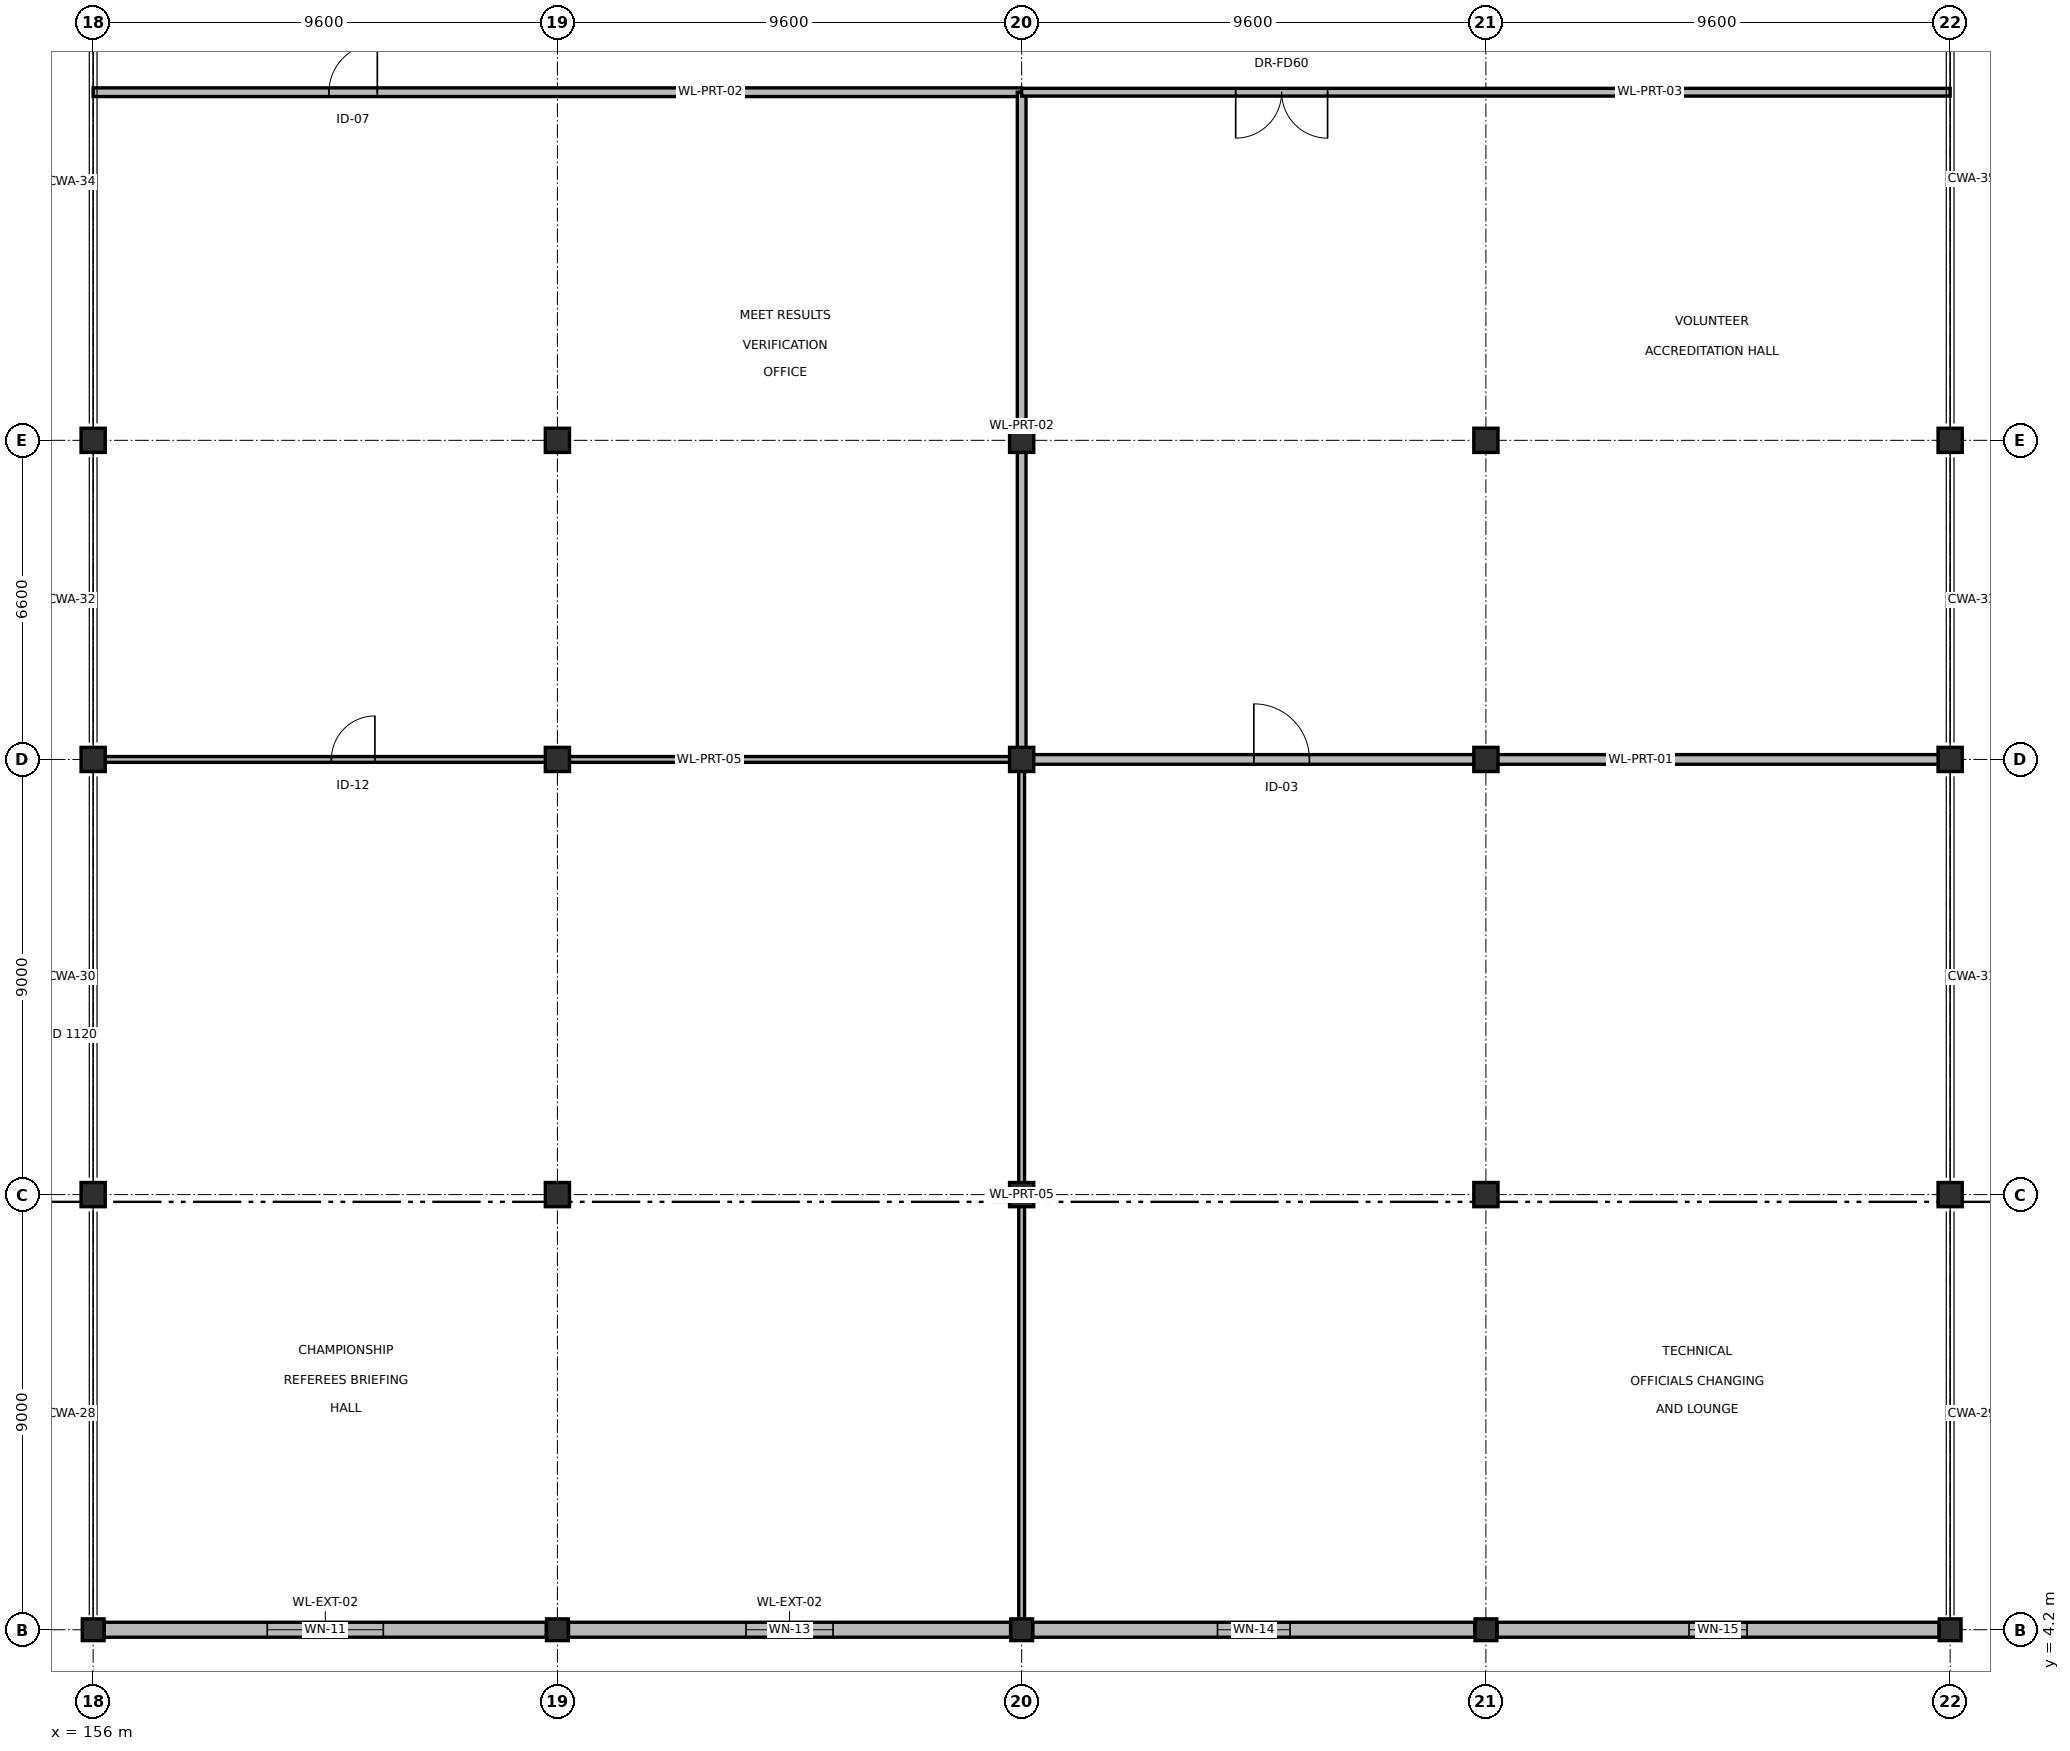
"""IFC4 building model, lengths in metres.
Left out: names, types, materials, properties, quantities, classifications, styles, units other than length and angle.
Written with IfcOpenShell. Run it as: python <this file> out.ifc"""

import sys

from ifc_helpers import new_model, si_unit, direction, frame, frame_2d, origin, origin_2d, place, context, subcontext, project, spatial, rectangle, extrude, element, fill, save


model = new_model("IFC4")
c1 = context("Model", 3, precision=1e-05, world=origin(), true_north=direction((0.0, 1.0)))
c2 = subcontext(c1, "Body", "Model", "MODEL_VIEW")
j1 = project(units=[si_unit("LENGTHUNIT", "METRE"), si_unit("PLANEANGLEUNIT", "RADIAN")], contexts=[c1])
p1 = place(None, origin())
s1 = spatial("IfcSite", under=j1, at=p1, CompositionType="ELEMENT")
p2 = place(p1, origin())
s2 = spatial("IfcBuilding", under=s1, at=p2, CompositionType="ELEMENT")
p3 = place(p2, frame((0.0, 0.0, 4.8)))
s3 = spatial("IfcBuildingStorey", under=s2, at=p3, CompositionType="ELEMENT", Elevation=4.8)
for number, where, z_axis, x_axis in (
    (1, (156.0, 13.2, 0.0), (0.0, 0.0, 1.0), (1.0, 0.0, 0.0)),
    (2, (156.0, 22.2, 0.0), (0.0, 0.0, 1.0), (1.0, 0.0, 0.0)),
    (3, (156.0, 28.8, 0.0), (0.0, 0.0, 1.0), (1.0, 0.0, 0.0)),
    (4, (165.6, 13.2, 0.0), (0.0, 0.0, 1.0), (1.0, 0.0, 0.0)),
    (5, (165.6, 22.2, 0.0), (0.0, 0.0, 1.0), (1.0, 0.0, 0.0)),
    (6, (165.6, 28.8, 0.0), (0.0, 0.0, 1.0), (1.0, 0.0, 0.0)),
    (7, (175.2, 13.2, 0.0), (0.0, 0.0, 1.0), (1.0, 0.0, 0.0)),
    (8, (175.2, 22.2, 0.0), (0.0, 0.0, 1.0), (1.0, 0.0, 0.0)),
    (9, (175.2, 28.8, 0.0), (0.0, 0.0, 1.0), (1.0, 0.0, 0.0)),
    (10, (184.8, 13.2, 0.0), (0.0, 0.0, 1.0), (1.0, 0.0, 0.0)),
    (11, (184.8, 22.2, 0.0), (0.0, 0.0, 1.0), (1.0, 0.0, 0.0)),
    (12, (184.8, 28.8, 0.0), (0.0, 0.0, 1.0), (1.0, 0.0, 0.0)),
    (13, (194.4, 13.2, 0.0), (0.0, 0.0, 1.0), (1.0, 0.0, 0.0)),
    (14, (194.4, 22.2, 0.0), (0.0, 0.0, 1.0), (1.0, 0.0, 0.0)),
    (15, (194.4, 28.8, 0.0), (0.0, 0.0, 1.0), (1.0, 0.0, 0.0)),
):
    element("IfcColumn", number, at=place(p3, frame(where, z_axis=z_axis, x_axis=x_axis)), inside=s3, PredefinedType="COLUMN", context=c2, shape_type="SweptSolid", body=[
        extrude(rectangle(XDim=0.5, YDim=0.5, at=origin_2d()), origin(), (0.0, 0.0, 1.0), 4.8),
    ])
for number, where, z_axis, x_axis in (
    (16, (156.0, 4.2, 0.0), (0.0, 0.0, 1.0), (1.0, 0.0, 0.0)),
    (17, (165.6, 4.2, 0.0), (0.0, 0.0, 1.0), (1.0, 0.0, 0.0)),
    (18, (175.2, 4.2, 0.0), (0.0, 0.0, 1.0), (1.0, 0.0, 0.0)),
    (19, (184.8, 4.2, 0.0), (0.0, 0.0, 1.0), (1.0, 0.0, 0.0)),
    (20, (194.4, 4.2, 0.0), (0.0, 0.0, 1.0), (1.0, 0.0, 0.0)),
):
    element("IfcColumn", number, at=place(p3, frame(where, z_axis=z_axis, x_axis=x_axis)), inside=s3, PredefinedType="COLUMN", context=c2, shape_type="SweptSolid", body=[
        extrude(rectangle(XDim=0.45, YDim=0.45, at=origin_2d()), origin(), (0.0, 0.0, 1.0), 4.8),
    ])
p4 = place(p3, frame((165.37, 4.2, 0.0), z_axis=(0.0, 0.0, 1.0), x_axis=(-1.0, 0.0, 0.0)))
e21 = element("IfcWall", 21, at=p4, inside=s3, PredefinedType="SOLIDWALL", context=c2, shape_type="SweptSolid", body=[
    extrude(rectangle(XDim=9.14, YDim=0.31, at=frame_2d((4.57, 0.0))), origin(), (0.0, 0.0, 1.0), 3.825),
])
p5 = place(p4, frame((3.37, 0.0, 0.95)))
e22 = element("IfcOpeningElement", 22, at=p5, cuts=e21, PredefinedType="OPENING", context=c2, shape_type="SweptSolid", body=[
    extrude(rectangle(XDim=2.4, YDim=1.5, at=frame_2d((1.2, 0.75))), frame((0.0, 0.165, 0.0), z_axis=(0.0, -1.0, 0.0), x_axis=(1.0, 0.0, 0.0)), (0.0, 0.0, 1.0), 0.33),
])
p6 = place(p3, frame((174.97, 4.2, 0.0), z_axis=(0.0, 0.0, 1.0), x_axis=(-1.0, 0.0, 0.0)))
e23 = element("IfcWall", 23, at=p6, inside=s3, PredefinedType="SOLIDWALL", context=c2, shape_type="SweptSolid", body=[
    extrude(rectangle(XDim=9.14, YDim=0.31, at=frame_2d((4.57, 0.0))), origin(), (0.0, 0.0, 1.0), 3.825),
])
p7 = place(p6, frame((3.67, 0.0, 0.95)))
e24 = element("IfcOpeningElement", 24, at=p7, cuts=e23, PredefinedType="OPENING", context=c2, shape_type="SweptSolid", body=[
    extrude(rectangle(XDim=1.8, YDim=1.5, at=frame_2d((0.9, 0.75))), frame((0.0, 0.165, 0.0), z_axis=(0.0, -1.0, 0.0), x_axis=(1.0, 0.0, 0.0)), (0.0, 0.0, 1.0), 0.33),
])
p8 = place(p3, frame((184.57, 4.2, 0.0), z_axis=(0.0, 0.0, 1.0), x_axis=(-1.0, 0.0, 0.0)))
e25 = element("IfcWall", 25, at=p8, inside=s3, PredefinedType="SOLIDWALL", context=c2, shape_type="SweptSolid", body=[
    extrude(rectangle(XDim=9.14, YDim=0.31, at=frame_2d((4.57, 0.0))), origin(), (0.0, 0.0, 1.0), 3.825),
])
p9 = place(p8, frame((3.82, 0.0, 0.95)))
e26 = element("IfcOpeningElement", 26, at=p9, cuts=e25, PredefinedType="OPENING", context=c2, shape_type="SweptSolid", body=[
    extrude(rectangle(XDim=1.5, YDim=1.5, at=frame_2d((0.75, 0.75))), frame((0.0, 0.165, 0.0), z_axis=(0.0, -1.0, 0.0), x_axis=(1.0, 0.0, 0.0)), (0.0, 0.0, 1.0), 0.33),
])
p10 = place(p3, frame((194.17, 4.2, 0.0), z_axis=(0.0, 0.0, 1.0), x_axis=(-1.0, 0.0, 0.0)))
e27 = element("IfcWall", 27, at=p10, inside=s3, PredefinedType="SOLIDWALL", context=c2, shape_type="SweptSolid", body=[
    extrude(rectangle(XDim=9.14, YDim=0.31, at=frame_2d((4.57, 0.0))), origin(), (0.0, 0.0, 1.0), 3.825),
])
p11 = place(p10, frame((3.97, 0.0, 0.95)))
e28 = element("IfcOpeningElement", 28, at=p11, cuts=e27, PredefinedType="OPENING", context=c2, shape_type="SweptSolid", body=[
    extrude(rectangle(XDim=1.2, YDim=1.5, at=frame_2d((0.6, 0.75))), frame((0.0, 0.165, 0.0), z_axis=(0.0, -1.0, 0.0), x_axis=(1.0, 0.0, 0.0)), (0.0, 0.0, 1.0), 0.33),
])
p12 = place(p3, frame((156.0, 22.2, 0.0), z_axis=(0.0, 0.0, 1.0), x_axis=(1.0, 0.0, 0.0)))
e29 = element("IfcWall", 29, at=p12, inside=s3, PredefinedType="PARTITIONING", context=c2, shape_type="SweptSolid", body=[
    extrude(rectangle(XDim=19.2, YDim=0.12, at=frame_2d((9.6, 0.0))), origin(), (0.0, 0.0, 1.0), 3.825),
])
p13 = place(p12, frame((4.926, 0.0, 0.0)))
e30 = element("IfcOpeningElement", 30, at=p13, cuts=e29, PredefinedType="OPENING", context=c2, shape_type="SweptSolid", body=[
    extrude(rectangle(XDim=0.9, YDim=2.1, at=frame_2d((0.45, 1.05))), frame((0.0, 0.07, 0.0), z_axis=(0.0, -1.0, 0.0), x_axis=(1.0, 0.0, 0.0)), (0.0, 0.0, 1.0), 0.14),
])
p14 = place(p3, frame((175.2, 4.2, 0.0), z_axis=(0.0, 0.0, 1.0), x_axis=(0.0, 1.0, 0.0)))
e31 = element("IfcWall", 31, at=p14, inside=s3, PredefinedType="PARTITIONING", context=c2, shape_type="SweptSolid", body=[
    extrude(rectangle(XDim=18.0, YDim=0.12, at=frame_2d((9.0, 0.0))), origin(), (0.0, 0.0, 1.0), 3.825),
])
p15 = place(p3, frame((175.2, 22.2, 0.0), z_axis=(0.0, 0.0, 1.0), x_axis=(1.0, 0.0, 0.0)))
e32 = element("IfcWall", 32, at=p15, inside=s3, PredefinedType="PARTITIONING", context=c2, shape_type="SweptSolid", body=[
    extrude(rectangle(XDim=19.2, YDim=0.2, at=frame_2d((9.6, 0.0))), origin(), (0.0, 0.0, 1.0), 3.825),
])
p16 = place(p15, frame((4.801, 0.0, 0.0)))
e33 = element("IfcOpeningElement", 33, at=p16, cuts=e32, PredefinedType="OPENING", context=c2, shape_type="SweptSolid", body=[
    extrude(rectangle(XDim=1.15, YDim=2.2, at=frame_2d((0.575, 1.1))), frame((0.0, 0.11, 0.0), z_axis=(0.0, -1.0, 0.0), x_axis=(1.0, 0.0, 0.0)), (0.0, 0.0, 1.0), 0.22),
])
p17 = place(p3, frame((156.0, 36.0, 0.0), z_axis=(0.0, 0.0, 1.0), x_axis=(1.0, 0.0, 0.0)))
e34 = element("IfcWall", 34, at=p17, inside=s3, PredefinedType="PARTITIONING", context=c2, shape_type="SweptSolid", body=[
    extrude(rectangle(XDim=19.2, YDim=0.18, at=frame_2d((9.6, 0.0))), origin(), (0.0, 0.0, 1.0), 3.775),
])
p18 = place(p17, frame((4.876, 0.0, 0.0)))
e35 = element("IfcOpeningElement", 35, at=p18, cuts=e34, PredefinedType="OPENING", context=c2, shape_type="SweptSolid", body=[
    extrude(rectangle(XDim=1.0, YDim=2.1, at=frame_2d((0.5, 1.05))), frame((0.0, 0.1, 0.0), z_axis=(0.0, -1.0, 0.0), x_axis=(1.0, 0.0, 0.0)), (0.0, 0.0, 1.0), 0.2),
])
p19 = place(p3, frame((175.2, 22.2, 0.0), z_axis=(0.0, 0.0, 1.0), x_axis=(0.0, 1.0, 0.0)))
e36 = element("IfcWall", 36, at=p19, inside=s3, PredefinedType="PARTITIONING", context=c2, shape_type="SweptSolid", body=[
    extrude(rectangle(XDim=13.8, YDim=0.18, at=frame_2d((6.9, 0.0))), origin(), (0.0, 0.0, 1.0), 3.775),
])
p20 = place(p3, frame((175.2, 36.0, 0.0), z_axis=(0.0, 0.0, 1.0), x_axis=(1.0, 0.0, 0.0)))
e37 = element("IfcWall", 37, at=p20, inside=s3, PredefinedType="PARTITIONING", context=c2, shape_type="SweptSolid", body=[
    extrude(rectangle(XDim=19.2, YDim=0.16, at=frame_2d((9.6, 0.0))), origin(), (0.0, 0.0, 1.0), 3.775),
])
p21 = place(p20, frame((4.426, 0.0, 0.0)))
e38 = element("IfcOpeningElement", 38, at=p21, cuts=e37, PredefinedType="OPENING", context=c2, shape_type="SweptSolid", body=[
    extrude(rectangle(XDim=1.9, YDim=2.2, at=frame_2d((0.95, 1.1))), frame((0.0, 0.09, 0.0), z_axis=(0.0, -1.0, 0.0), x_axis=(1.0, 0.0, 0.0)), (0.0, 0.0, 1.0), 0.18),
])
p22 = place(p5, origin())
e39 = element("IfcWindow", 39, at=p22, inside=s3, PartitioningType="SINGLE_PANEL", PredefinedType="WINDOW", context=c2, shape_type="SweptSolid", body=[
    extrude(rectangle(XDim=2.4, YDim=1.5, at=frame_2d((1.2, 0.75))), frame((0.0, 0.03, 0.0), z_axis=(0.0, -1.0, 0.0), x_axis=(1.0, 0.0, 0.0)), (0.0, 0.0, 1.0), 0.06),
])
fill(e22, e39)
p23 = place(p7, origin())
e40 = element("IfcWindow", 40, at=p23, inside=s3, PartitioningType="SINGLE_PANEL", PredefinedType="WINDOW", context=c2, shape_type="SweptSolid", body=[
    extrude(rectangle(XDim=1.8, YDim=1.5, at=frame_2d((0.9, 0.75))), frame((0.0, 0.03, 0.0), z_axis=(0.0, -1.0, 0.0), x_axis=(1.0, 0.0, 0.0)), (0.0, 0.0, 1.0), 0.06),
])
fill(e24, e40)
p24 = place(p9, origin())
e41 = element("IfcWindow", 41, at=p24, inside=s3, PartitioningType="SINGLE_PANEL", PredefinedType="WINDOW", context=c2, shape_type="SweptSolid", body=[
    extrude(rectangle(XDim=1.5, YDim=1.5, at=frame_2d((0.75, 0.75))), frame((0.0, 0.03, 0.0), z_axis=(0.0, -1.0, 0.0), x_axis=(1.0, 0.0, 0.0)), (0.0, 0.0, 1.0), 0.06),
])
fill(e26, e41)
p25 = place(p11, origin())
e42 = element("IfcWindow", 42, at=p25, inside=s3, PartitioningType="SINGLE_PANEL", PredefinedType="WINDOW", context=c2, shape_type="SweptSolid", body=[
    extrude(rectangle(XDim=1.2, YDim=1.5, at=frame_2d((0.6, 0.75))), frame((0.0, 0.03, 0.0), z_axis=(0.0, -1.0, 0.0), x_axis=(1.0, 0.0, 0.0)), (0.0, 0.0, 1.0), 0.06),
])
fill(e28, e42)
p26 = place(p13, origin())
e43 = element("IfcDoor", 43, at=p26, inside=s3, OperationType="SINGLE_SWING_RIGHT", PredefinedType="DOOR", context=c2, shape_type="SweptSolid", body=[
    extrude(rectangle(XDim=0.9, YDim=2.1, at=frame_2d((0.45, 1.05))), frame((0.0, 0.025, 0.0), z_axis=(0.0, -1.0, 0.0), x_axis=(1.0, 0.0, 0.0)), (0.0, 0.0, 1.0), 0.05),
])
fill(e30, e43)
p27 = place(p16, origin())
e44 = element("IfcDoor", 44, at=p27, inside=s3, OperationType="SINGLE_SWING_LEFT", PredefinedType="DOOR", context=c2, shape_type="SweptSolid", body=[
    extrude(rectangle(XDim=1.15, YDim=2.2, at=frame_2d((0.575, 1.1))), frame((0.0, 0.025, 0.0), z_axis=(0.0, -1.0, 0.0), x_axis=(1.0, 0.0, 0.0)), (0.0, 0.0, 1.0), 0.05),
])
fill(e33, e44)
p28 = place(p18, origin())
e45 = element("IfcDoor", 45, at=p28, inside=s3, OperationType="SINGLE_SWING_RIGHT", PredefinedType="DOOR", context=c2, shape_type="SweptSolid", body=[
    extrude(rectangle(XDim=1.0, YDim=2.1, at=frame_2d((0.5, 1.05))), frame((0.0, 0.025, 0.0), z_axis=(0.0, -1.0, 0.0), x_axis=(1.0, 0.0, 0.0)), (0.0, 0.0, 1.0), 0.05),
])
fill(e35, e45)
p29 = place(p21, origin())
e46 = element("IfcDoor", 46, at=p29, inside=s3, OperationType="DOUBLE_DOOR_SINGLE_SWING", PredefinedType="DOOR", context=c2, shape_type="SweptSolid", body=[
    extrude(rectangle(XDim=1.9, YDim=2.2, at=frame_2d((0.95, 1.1))), frame((0.0, 0.025, 0.0), z_axis=(0.0, -1.0, 0.0), x_axis=(1.0, 0.0, 0.0)), (0.0, 0.0, 1.0), 0.05),
])
fill(e38, e46)
save(model, sys.argv[1])
